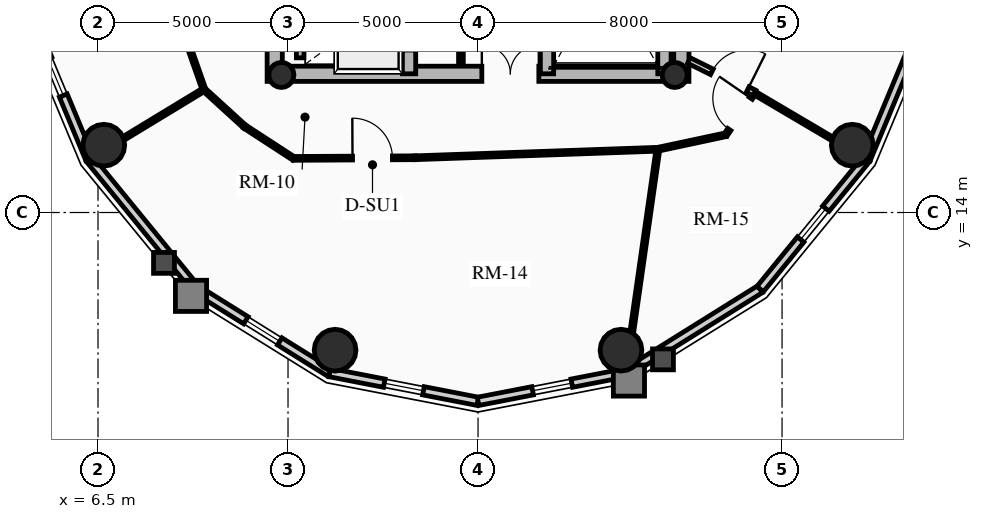
"""IFC4 building model, lengths in metres.
Left out: names, types, materials, properties, quantities, classifications, styles, units other than length and angle.
Written with IfcOpenShell. Run it as: python <this file> out.ifc"""

import sys

from ifc_helpers import new_model, si_unit, direction, frame, frame_2d, origin, origin_2d, place, context, subcontext, project, spatial, rectangle, circle, hollow_circle, extrude, source, transform, mapped, element, fill, save


model = new_model("IFC4")
c1 = context("Model", 3, precision=1e-05, world=origin(), true_north=direction((0.0, 1.0)))
c2 = subcontext(c1, "Body", "Model", "MODEL_VIEW")
j1 = project(units=[si_unit("LENGTHUNIT", "METRE"), si_unit("PLANEANGLEUNIT", "RADIAN")], contexts=[c1])
p1 = place(None, origin())
s1 = spatial("IfcSite", under=j1, at=p1, CompositionType="ELEMENT")
p2 = place(p1, origin())
s2 = spatial("IfcBuilding", under=s1, at=p2, CompositionType="ELEMENT")
p3 = place(p2, frame((0.0, 0.0, 202.48)))
s3 = spatial("IfcBuildingStorey", under=s2, at=p3, CompositionType="ELEMENT", Elevation=202.48)
for number, where, z_axis, x_axis in (
    (1, (11.15, 17.45, 0.0), (0.0, 0.0, 1.0), (0.0, 1.0, 0.0)),
    (2, (21.85, 17.45, 0.0), (0.0, 0.0, 1.0), (0.0, 1.0, 0.0)),
):
    element("IfcWall", number, at=place(p3, frame(where, z_axis=z_axis, x_axis=x_axis)), inside=s3, PredefinedType="SHEAR", context=c2, shape_type="SweptSolid", body=[
        extrude(rectangle(XDim=14.1, YDim=0.4, at=frame_2d((7.05, 0.0))), origin(), (0.0, 0.0, 1.0), 2.91),
    ])
p4 = place(p3, frame((11.15, 17.65, 0.0), z_axis=(0.0, 0.0, 1.0), x_axis=(1.0, 0.0, 0.0)))
e3 = element("IfcWall", 3, at=p4, inside=s3, PredefinedType="SHEAR", context=c2, shape_type="SweptSolid", body=[
    extrude(rectangle(XDim=10.7, YDim=0.4, at=frame_2d((5.35, 0.0))), origin(), (0.0, 0.0, 1.0), 2.91),
])
m1 = source(origin(), c2, "Body", "SweptSolid", [
    extrude(rectangle(XDim=1.5, YDim=2.02, at=frame_2d((0.75, 1.01))), frame((0.0, 0.21, 0.0), z_axis=(0.0, -1.0, 0.0), x_axis=(1.0, 0.0, 0.0)), (0.0, 0.0, 1.0), 0.42),
])
p5 = place(p4, frame((5.45, 0.0, 0.0)))
e4 = element("IfcOpeningElement", 4, at=p5, cuts=e3, PredefinedType="OPENING", context=c2, shape_type="MappedRepresentation", body=[
    mapped(m1, transform((0.0, 0.0, 0.0), x_axis=(1.0, 0.0, 0.0), y_axis=(0.0, 1.0, 0.0), z_axis=(0.0, 0.0, 1.0), scale=1.0)),
])
p6 = place(p3, frame((14.685, 17.65, 0.0), z_axis=(0.0, 0.0, 1.0), x_axis=(0.0, 1.0, 0.0)))
e5 = element("IfcWall", 5, at=p6, inside=s3, PredefinedType="SHEAR", context=c2, shape_type="SweptSolid", body=[
    extrude(rectangle(XDim=13.7, YDim=0.35, at=frame_2d((6.85, 0.0))), origin(), (0.0, 0.0, 1.0), 2.91),
])
m2 = source(origin(), c2, "Body", "SweptSolid", [
    extrude(rectangle(XDim=1.1, YDim=2.015, at=frame_2d((0.55, 1.007))), frame((0.0, 0.185, 0.0), z_axis=(0.0, -1.0, 0.0), x_axis=(1.0, 0.0, 0.0)), (0.0, 0.0, 1.0), 0.37),
])
p7 = place(p6, frame((4.85, 0.0, 0.0)))
e6 = element("IfcOpeningElement", 6, at=p7, cuts=e5, PredefinedType="OPENING", context=c2, shape_type="MappedRepresentation", body=[
    mapped(m2, transform((0.0, 0.0, 0.0), x_axis=(1.0, 0.0, 0.0), y_axis=(0.0, 1.0, 0.0), z_axis=(0.0, 0.0, 1.0), scale=1.0)),
])
p8 = place(p6, frame((0.625, 0.0, 0.0)))
e7 = element("IfcOpeningElement", 7, at=p8, cuts=e5, PredefinedType="OPENING", context=c2, shape_type="MappedRepresentation", body=[
    mapped(m2, transform((0.0, 0.0, 0.0), x_axis=(1.0, 0.0, 0.0), y_axis=(0.0, 1.0, 0.0), z_axis=(0.0, 0.0, 1.0), scale=1.0)),
])
p9 = place(p6, frame((2.625, 0.0, 0.0)))
e8 = element("IfcOpeningElement", 8, at=p9, cuts=e5, PredefinedType="OPENING", context=c2, shape_type="MappedRepresentation", body=[
    mapped(m2, transform((0.0, 0.0, 0.0), x_axis=(1.0, 0.0, 0.0), y_axis=(0.0, 1.0, 0.0), z_axis=(0.0, 0.0, 1.0), scale=1.0)),
])
m3 = source(origin(), c2, "Body", "SweptSolid", [
    extrude(rectangle(XDim=1.15, YDim=2.02, at=frame_2d((0.575, 1.01))), frame((0.0, 0.185, 0.0), z_axis=(0.0, -1.0, 0.0), x_axis=(1.0, 0.0, 0.0)), (0.0, 0.0, 1.0), 0.37),
])
p10 = place(p6, frame((7.27, 0.0, 0.0)))
e9 = element("IfcOpeningElement", 9, at=p10, cuts=e5, PredefinedType="OPENING", context=c2, shape_type="MappedRepresentation", body=[
    mapped(m3, transform((0.0, 0.0, 0.0), x_axis=(1.0, 0.0, 0.0), y_axis=(0.0, 1.0, 0.0), z_axis=(0.0, 0.0, 1.0), scale=1.0)),
])
p11 = place(p3, frame((18.315, 17.65, 0.0), z_axis=(0.0, 0.0, 1.0), x_axis=(0.0, 1.0, 0.0)))
e10 = element("IfcWall", 10, at=p11, inside=s3, PredefinedType="SHEAR", context=c2, shape_type="SweptSolid", body=[
    extrude(rectangle(XDim=9.6, YDim=0.35, at=frame_2d((4.8, 0.0))), origin(), (0.0, 0.0, 1.0), 2.91),
])
p12 = place(p11, frame((5.28, 0.0, 0.0)))
e11 = element("IfcOpeningElement", 11, at=p12, cuts=e10, PredefinedType="OPENING", context=c2, shape_type="MappedRepresentation", body=[
    mapped(m3, transform((0.0, 0.0, 0.0), x_axis=(1.0, 0.0, 0.0), y_axis=(0.0, 1.0, 0.0), z_axis=(0.0, 0.0, 1.0), scale=1.0)),
])
p13 = place(p3, frame((21.405, 17.65, 0.0), z_axis=(0.0, 0.0, 1.0), x_axis=(0.0, 1.0, 0.0)))
e12 = element("IfcWall", 12, at=p13, inside=s3, PredefinedType="SHEAR", context=c2, shape_type="SweptSolid", body=[
    extrude(rectangle(XDim=6.695, YDim=0.35, at=frame_2d((3.348, 0.0))), origin(), (0.0, 0.0, 1.0), 2.91),
])
for number, where, z_axis, x_axis in (
    (13, (11.325, 17.62, 0.0), (0.0, 0.0, 1.0), (1.0, 0.0, 0.0)),
    (14, (21.675, 17.62, 0.0), (0.0, 0.0, 1.0), (1.0, 0.0, 0.0)),
):
    element("IfcColumn", number, at=place(p3, frame(where, z_axis=z_axis, x_axis=x_axis)), inside=s3, PredefinedType="COLUMN", context=c2, shape_type="SweptSolid", body=[
        extrude(hollow_circle(Radius=0.33, WallThickness=0.025, at=origin_2d()), origin(), (0.0, 0.0, 1.0), 2.91),
    ])
for number, where, z_axis, x_axis in (
    (15, (6.653, 15.771, 0.0), (0.0, 0.0, 1.0), (1.0, 0.0, 0.0)),
    (16, (12.739, 10.377, 0.0), (0.0, 0.0, 1.0), (1.0, 0.0, 0.0)),
    (17, (20.261, 10.377, 0.0), (0.0, 0.0, 1.0), (1.0, 0.0, 0.0)),
    (18, (26.347, 15.771, 0.0), (0.0, 0.0, 1.0), (1.0, 0.0, 0.0)),
):
    element("IfcColumn", number, at=place(p3, frame(where, z_axis=z_axis, x_axis=x_axis)), inside=s3, PredefinedType="USERDEFINED", context=c2, shape_type="SweptSolid", body=[
        extrude(circle(Radius=0.55, at=origin_2d()), origin(), (0.0, 0.0, 1.0), 2.91),
    ])
p14 = place(p3, frame((6.282, 15.407, 0.0), z_axis=(0.0, 0.0, 1.0), x_axis=(-0.384036305194, 0.923317993052, 0.0)))
e19 = element("IfcWall", 19, at=p14, inside=s3, PredefinedType="SOLIDWALL", context=c2, shape_type="SweptSolid", body=[
    extrude(rectangle(XDim=4.671, YDim=0.22, at=frame_2d((2.335, 0.0))), origin(), (0.0, 0.0, 1.0), 2.322),
])
m4 = source(origin(), c2, "Body", "SweptSolid", [
    extrude(rectangle(XDim=1.05, YDim=1.3, at=frame_2d((0.525, 0.65))), frame((0.0, 0.12, 0.0), z_axis=(0.0, -1.0, 0.0), x_axis=(1.0, 0.0, 0.0)), (0.0, 0.0, 1.0), 0.24),
])
p15 = place(p14, frame((1.81, 0.0, 0.65)))
e20 = element("IfcOpeningElement", 20, at=p15, cuts=e19, PredefinedType="OPENING", context=c2, shape_type="MappedRepresentation", body=[
    mapped(m4, transform((0.0, 0.0, 0.0), x_axis=(1.0, 0.0, 0.0), y_axis=(0.0, 1.0, 0.0), z_axis=(0.0, 0.0, 1.0), scale=1.0)),
])
p16 = place(p3, frame((9.076, 11.985, 0.0), z_axis=(0.0, 0.0, 1.0), x_axis=(-0.632467166636, 0.774587169483, 0.0)))
e21 = element("IfcWall", 21, at=p16, inside=s3, PredefinedType="SOLIDWALL", context=c2, shape_type="SweptSolid", body=[
    extrude(rectangle(XDim=4.418, YDim=0.22, at=frame_2d((2.209, 0.0))), origin(), (0.0, 0.0, 1.0), 2.322),
])
p17 = place(p3, frame((12.597, 9.787, 0.0), z_axis=(0.0, 0.0, 1.0), x_axis=(-0.848318713376, 0.529485939886, 0.0)))
e22 = element("IfcWall", 22, at=p17, inside=s3, PredefinedType="SOLIDWALL", context=c2, shape_type="SweptSolid", body=[
    extrude(rectangle(XDim=4.15, YDim=0.22, at=frame_2d((2.075, 0.0))), origin(), (0.0, 0.0, 1.0), 2.322),
])
p18 = place(p17, frame((1.55, 0.0, 0.65)))
e23 = element("IfcOpeningElement", 23, at=p18, cuts=e22, PredefinedType="OPENING", context=c2, shape_type="MappedRepresentation", body=[
    mapped(m4, transform((0.0, 0.0, 0.0), x_axis=(1.0, 0.0, 0.0), y_axis=(0.0, 1.0, 0.0), z_axis=(0.0, 0.0, 1.0), scale=1.0)),
])
p19 = place(p3, frame((16.5, 9.03, 0.0), z_axis=(0.0, 0.0, 1.0), x_axis=(-0.981700307484, 0.190432419211, 0.0)))
e24 = element("IfcWall", 24, at=p19, inside=s3, PredefinedType="SOLIDWALL", context=c2, shape_type="SweptSolid", body=[
    extrude(rectangle(XDim=3.976, YDim=0.22, at=frame_2d((1.988, 0.0))), origin(), (0.0, 0.0, 1.0), 2.322),
])
p20 = place(p19, frame((1.463, 0.0, 0.65)))
e25 = element("IfcOpeningElement", 25, at=p20, cuts=e24, PredefinedType="OPENING", context=c2, shape_type="MappedRepresentation", body=[
    mapped(m4, transform((0.0, 0.0, 0.0), x_axis=(1.0, 0.0, 0.0), y_axis=(0.0, 1.0, 0.0), z_axis=(0.0, 0.0, 1.0), scale=1.0)),
])
p21 = place(p3, frame((20.403, 9.787, 0.0), z_axis=(0.0, 0.0, 1.0), x_axis=(-0.981700307484, -0.190432419211, 0.0)))
e26 = element("IfcWall", 26, at=p21, inside=s3, PredefinedType="SOLIDWALL", context=c2, shape_type="SweptSolid", body=[
    extrude(rectangle(XDim=3.976, YDim=0.22, at=frame_2d((1.988, 0.0))), origin(), (0.0, 0.0, 1.0), 2.322),
])
p22 = place(p21, frame((1.463, 0.0, 0.65)))
e27 = element("IfcOpeningElement", 27, at=p22, cuts=e26, PredefinedType="OPENING", context=c2, shape_type="MappedRepresentation", body=[
    mapped(m4, transform((0.0, 0.0, 0.0), x_axis=(1.0, 0.0, 0.0), y_axis=(0.0, 1.0, 0.0), z_axis=(0.0, 0.0, 1.0), scale=1.0)),
])
p23 = place(p3, frame((23.924, 11.985, 0.0), z_axis=(0.0, 0.0, 1.0), x_axis=(-0.848318713376, -0.529485939886, 0.0)))
e28 = element("IfcWall", 28, at=p23, inside=s3, PredefinedType="SOLIDWALL", context=c2, shape_type="SweptSolid", body=[
    extrude(rectangle(XDim=4.15, YDim=0.22, at=frame_2d((2.075, 0.0))), origin(), (0.0, 0.0, 1.0), 2.322),
])
p24 = place(p3, frame((26.718, 15.407, 0.0), z_axis=(0.0, 0.0, 1.0), x_axis=(-0.632467166636, -0.774587169483, 0.0)))
e29 = element("IfcWall", 29, at=p24, inside=s3, PredefinedType="SOLIDWALL", context=c2, shape_type="SweptSolid", body=[
    extrude(rectangle(XDim=4.418, YDim=0.22, at=frame_2d((2.209, 0.0))), origin(), (0.0, 0.0, 1.0), 2.322),
])
p25 = place(p24, frame((1.684, 0.0, 0.65)))
e30 = element("IfcOpeningElement", 30, at=p25, cuts=e29, PredefinedType="OPENING", context=c2, shape_type="MappedRepresentation", body=[
    mapped(m4, transform((0.0, 0.0, 0.0), x_axis=(1.0, 0.0, 0.0), y_axis=(0.0, 1.0, 0.0), z_axis=(0.0, 0.0, 1.0), scale=1.0)),
])
p26 = place(p3, frame((28.512, 19.719, 0.0), z_axis=(0.0, 0.0, 1.0), x_axis=(-0.384036305194, -0.923317993052, 0.0)))
e31 = element("IfcWall", 31, at=p26, inside=s3, PredefinedType="SOLIDWALL", context=c2, shape_type="SweptSolid", body=[
    extrude(rectangle(XDim=4.671, YDim=0.22, at=frame_2d((2.335, 0.0))), origin(), (0.0, 0.0, 1.0), 2.322),
])
p27 = place(p3, frame((11.82, 18.07, 0.0), z_axis=(0.0, 0.0, 1.0), x_axis=(0.0, 1.0, 0.0)))
e32 = element("IfcWall", 32, at=p27, inside=s3, PredefinedType="SHEAR", context=c2, shape_type="SweptSolid", body=[
    extrude(rectangle(XDim=1.635, YDim=0.2, at=frame_2d((0.817, 0.0))), origin(), (0.0, 0.0, 1.0), 2.91),
])
p28 = place(p3, frame((16.05, 17.92, 0.0), z_axis=(0.0, 0.0, 1.0), x_axis=(0.0, 1.0, 0.0)))
e33 = element("IfcWall", 33, at=p28, inside=s3, PredefinedType="PARTITIONING", context=c2, shape_type="SweptSolid", body=[
    extrude(rectangle(XDim=3.08, YDim=0.125, at=frame_2d((1.54, 0.0))), origin(), (0.0, 0.0, 1.0), 2.685),
])
m5 = source(origin(), c2, "Body", "SweptSolid", [
    extrude(rectangle(XDim=0.9, YDim=2.005, at=frame_2d((0.45, 1.002))), frame((0.0, 0.073, 0.0), z_axis=(0.0, -1.0, 0.0), x_axis=(1.0, 0.0, 0.0)), (0.0, 0.0, 1.0), 0.145),
])
p29 = place(p28, frame((1.05, 0.0, 0.0)))
e34 = element("IfcOpeningElement", 34, at=p29, cuts=e33, PredefinedType="OPENING", context=c2, shape_type="MappedRepresentation", body=[
    mapped(m5, transform((0.0, 0.0, 0.0), x_axis=(1.0, 0.0, 0.0), y_axis=(0.0, 1.0, 0.0), z_axis=(0.0, 0.0, 1.0), scale=1.0)),
])
p30 = place(p3, frame((8.832, 18.534, 0.0), z_axis=(0.0, 0.0, 1.0), x_axis=(0.332031819657, -0.943268186008, 0.0)))
e35 = element("IfcWall", 35, at=p30, inside=s3, PredefinedType="MOVABLE", context=c2, shape_type="SweptSolid", body=[
    extrude(rectangle(XDim=1.377, YDim=0.1, at=frame_2d((0.688, 0.0))), origin(), (0.0, 0.0, 1.0), 2.255),
])
p31 = place(p3, frame((9.289, 17.235, 0.0), z_axis=(0.0, 0.0, 1.0), x_axis=(0.739015164946, -0.673688790155, 0.0)))
e36 = element("IfcWall", 36, at=p31, inside=s3, PredefinedType="MOVABLE", context=c2, shape_type="SweptSolid", body=[
    extrude(rectangle(XDim=1.446, YDim=0.1, at=frame_2d((0.723, 0.0))), origin(), (0.0, 0.0, 1.0), 2.322),
])
p32 = place(p3, frame((10.358, 16.26, 0.0), z_axis=(0.0, 0.0, 1.0), x_axis=(0.838265397059, -0.545262435983, 0.0)))
e37 = element("IfcWall", 37, at=p32, inside=s3, PredefinedType="MOVABLE", context=c2, shape_type="SweptSolid", body=[
    extrude(rectangle(XDim=1.534, YDim=0.1, at=frame_2d((0.767, 0.0))), origin(), (0.0, 0.0, 1.0), 2.255),
])
p33 = place(p3, frame((11.644, 15.424, 0.0), z_axis=(0.0, 0.0, 1.0), x_axis=(0.999986552511, 0.005186019339, 0.0)))
e38 = element("IfcWall", 38, at=p33, inside=s3, PredefinedType="MOVABLE", context=c2, shape_type="SweptSolid", body=[
    extrude(rectangle(XDim=3.201, YDim=0.1, at=frame_2d((1.601, 0.0))), origin(), (0.0, 0.0, 1.0), 2.322),
])
m6 = source(origin(), c2, "Body", "SweptSolid", [
    extrude(rectangle(XDim=1.05, YDim=2.015, at=frame_2d((0.525, 1.007))), frame((0.0, 0.06, 0.0), z_axis=(0.0, -1.0, 0.0), x_axis=(1.0, 0.0, 0.0)), (0.0, 0.0, 1.0), 0.12),
])
p34 = place(p33, frame((1.553, 0.0, 0.0)))
e39 = element("IfcOpeningElement", 39, at=p34, cuts=e38, PredefinedType="OPENING", context=c2, shape_type="MappedRepresentation", body=[
    mapped(m6, transform((0.0, 0.0, 0.0), x_axis=(1.0, 0.0, 0.0), y_axis=(0.0, 1.0, 0.0), z_axis=(0.0, 0.0, 1.0), scale=1.0)),
])
p35 = place(p3, frame((14.845, 15.441, 0.0), z_axis=(0.0, 0.0, 1.0), x_axis=(0.99938794868, 0.034981824334, 0.0)))
e40 = element("IfcWall", 40, at=p35, inside=s3, PredefinedType="MOVABLE", context=c2, shape_type="SweptSolid", body=[
    extrude(rectangle(XDim=6.393, YDim=0.1, at=frame_2d((3.196, 0.0))), origin(), (0.0, 0.0, 1.0), 2.255),
])
p36 = place(p3, frame((21.234, 15.664, 0.0), z_axis=(0.0, 0.0, 1.0), x_axis=(0.977931581182, 0.208925399431, 0.0)))
e41 = element("IfcWall", 41, at=p36, inside=s3, PredefinedType="MOVABLE", context=c2, shape_type="SweptSolid", body=[
    extrude(rectangle(XDim=1.823, YDim=0.1, at=frame_2d((0.912, 0.0))), origin(), (0.0, 0.0, 1.0), 2.255),
])
p37 = place(p3, frame((23.017, 16.045, 0.0), z_axis=(0.0, 0.0, 1.0), x_axis=(0.566660656138, 0.823951273308, 0.0)))
e42 = element("IfcWall", 42, at=p37, inside=s3, PredefinedType="MOVABLE", context=c2, shape_type="SweptSolid", body=[
    extrude(rectangle(XDim=1.336, YDim=0.1, at=frame_2d((0.668, 0.0))), origin(), (0.0, 0.0, 1.0), 2.322),
])
m7 = source(origin(), c2, "Body", "SweptSolid", [
    extrude(rectangle(XDim=1.0, YDim=2.015, at=frame_2d((0.5, 1.007))), frame((0.0, 0.06, 0.0), z_axis=(0.0, -1.0, 0.0), x_axis=(1.0, 0.0, 0.0)), (0.0, 0.0, 1.0), 0.12),
])
p38 = place(p37, frame((0.168, 0.0, 0.0)))
e43 = element("IfcOpeningElement", 43, at=p38, cuts=e42, PredefinedType="OPENING", context=c2, shape_type="MappedRepresentation", body=[
    mapped(m7, transform((0.0, 0.0, 0.0), x_axis=(1.0, 0.0, 0.0), y_axis=(0.0, 1.0, 0.0), z_axis=(0.0, 0.0, 1.0), scale=1.0)),
])
p39 = place(p3, frame((9.289, 17.235, 0.0), z_axis=(0.0, 0.0, 1.0), x_axis=(-0.854741081983, -0.519054604806, 0.0)))
e44 = element("IfcWall", 44, at=p39, inside=s3, PredefinedType="MOVABLE", context=c2, shape_type="SweptSolid", body=[
    extrude(rectangle(XDim=3.499, YDim=0.1, at=frame_2d((1.75, 0.0))), origin(), (0.0, 0.0, 1.0), 2.322),
])
p40 = place(p3, frame((21.234, 15.664, 0.0), z_axis=(0.0, 0.0, 1.0), x_axis=(-0.141467563045, -0.989942891588, 0.0)))
e45 = element("IfcWall", 45, at=p40, inside=s3, PredefinedType="MOVABLE", context=c2, shape_type="SweptSolid", body=[
    extrude(rectangle(XDim=5.918, YDim=0.1, at=frame_2d((2.959, 0.0))), origin(), (0.0, 0.0, 1.0), 2.322),
])
p41 = place(p3, frame((23.774, 17.146, 0.0), z_axis=(0.0, 0.0, 1.0), x_axis=(0.861296601099, -0.508102514198, 0.0)))
e46 = element("IfcWall", 46, at=p41, inside=s3, PredefinedType="MOVABLE", context=c2, shape_type="SweptSolid", body=[
    extrude(rectangle(XDim=3.399, YDim=0.1, at=frame_2d((1.7, 0.0))), origin(), (0.0, 0.0, 1.0), 2.322),
])
p42 = place(p3, frame((22.05, 18.0, 0.0), z_axis=(0.0, 0.0, 1.0), x_axis=(0.896045848613, -0.443961526692, 0.0)))
e47 = element("IfcWall", 47, at=p42, inside=s3, PredefinedType="PARTITIONING", context=c2, shape_type="SweptSolid", body=[
    extrude(rectangle(XDim=1.924, YDim=0.16, at=frame_2d((0.962, 0.0))), origin(), (0.0, 0.0, 1.0), 2.255),
])
m8 = source(origin(), c2, "Body", "SweptSolid", [
    extrude(rectangle(XDim=1.05, YDim=2.015, at=frame_2d((0.525, 1.007))), frame((0.0, 0.09, 0.0), z_axis=(0.0, -1.0, 0.0), x_axis=(1.0, 0.0, 0.0)), (0.0, 0.0, 1.0), 0.18),
])
p43 = place(p42, frame((0.674, 0.0, 0.0)))
e48 = element("IfcOpeningElement", 48, at=p43, cuts=e47, PredefinedType="OPENING", context=c2, shape_type="MappedRepresentation", body=[
    mapped(m8, transform((0.0, 0.0, 0.0), x_axis=(1.0, 0.0, 0.0), y_axis=(0.0, 1.0, 0.0), z_axis=(0.0, 0.0, 1.0), scale=1.0)),
])
m9 = source(origin(), c2, "Body", "SweptSolid", [
    extrude(rectangle(XDim=1.05, YDim=1.3, at=frame_2d((0.525, 0.65))), frame((0.0, 0.03, 0.0), z_axis=(0.0, -1.0, 0.0), x_axis=(1.0, 0.0, 0.0)), (0.0, 0.0, 1.0), 0.06),
])
p44 = place(p15, origin())
e49 = element("IfcWindow", 49, at=p44, inside=s3, PartitioningType="SINGLE_PANEL", PredefinedType="WINDOW", context=c2, shape_type="MappedRepresentation", body=[
    mapped(m9, transform((0.0, 0.0, 0.0), x_axis=(1.0, 0.0, 0.0), y_axis=(0.0, 1.0, 0.0), z_axis=(0.0, 0.0, 1.0), scale=1.0)),
])
fill(e20, e49)
p45 = place(p18, origin())
e50 = element("IfcWindow", 50, at=p45, inside=s3, PartitioningType="SINGLE_PANEL", PredefinedType="WINDOW", context=c2, shape_type="MappedRepresentation", body=[
    mapped(m9, transform((0.0, 0.0, 0.0), x_axis=(1.0, 0.0, 0.0), y_axis=(0.0, 1.0, 0.0), z_axis=(0.0, 0.0, 1.0), scale=1.0)),
])
fill(e23, e50)
p46 = place(p20, origin())
e51 = element("IfcWindow", 51, at=p46, inside=s3, PartitioningType="SINGLE_PANEL", PredefinedType="WINDOW", context=c2, shape_type="MappedRepresentation", body=[
    mapped(m9, transform((0.0, 0.0, 0.0), x_axis=(1.0, 0.0, 0.0), y_axis=(0.0, 1.0, 0.0), z_axis=(0.0, 0.0, 1.0), scale=1.0)),
])
fill(e25, e51)
p47 = place(p22, origin())
e52 = element("IfcWindow", 52, at=p47, inside=s3, PartitioningType="SINGLE_PANEL", PredefinedType="WINDOW", context=c2, shape_type="MappedRepresentation", body=[
    mapped(m9, transform((0.0, 0.0, 0.0), x_axis=(1.0, 0.0, 0.0), y_axis=(0.0, 1.0, 0.0), z_axis=(0.0, 0.0, 1.0), scale=1.0)),
])
fill(e27, e52)
p48 = place(p25, origin())
e53 = element("IfcWindow", 53, at=p48, inside=s3, PartitioningType="SINGLE_PANEL", PredefinedType="WINDOW", context=c2, shape_type="MappedRepresentation", body=[
    mapped(m9, transform((0.0, 0.0, 0.0), x_axis=(1.0, 0.0, 0.0), y_axis=(0.0, 1.0, 0.0), z_axis=(0.0, 0.0, 1.0), scale=1.0)),
])
fill(e30, e53)
m10 = source(origin(), c2, "Body", "SweptSolid", [
    extrude(rectangle(XDim=1.5, YDim=2.02, at=frame_2d((0.75, 1.01))), frame((0.0, 0.025, 0.0), z_axis=(0.0, -1.0, 0.0), x_axis=(1.0, 0.0, 0.0)), (0.0, 0.0, 1.0), 0.05),
])
p49 = place(p5, origin())
e54 = element("IfcDoor", 54, at=p49, inside=s3, OperationType="DOUBLE_DOOR_SINGLE_SWING", PredefinedType="DOOR", context=c2, shape_type="MappedRepresentation", body=[
    mapped(m10, transform((0.0, 0.0, 0.0), x_axis=(1.0, 0.0, 0.0), y_axis=(0.0, 1.0, 0.0), z_axis=(0.0, 0.0, 1.0), scale=1.0)),
])
fill(e4, e54)
m11 = source(origin(), c2, "Body", "SweptSolid", [
    extrude(rectangle(XDim=1.05, YDim=2.015, at=frame_2d((0.525, 1.007))), frame((0.0, 0.025, 0.0), z_axis=(0.0, -1.0, 0.0), x_axis=(1.0, 0.0, 0.0)), (0.0, 0.0, 1.0), 0.05),
])
p50 = place(p43, origin())
e55 = element("IfcDoor", 55, at=p50, inside=s3, OperationType="SINGLE_SWING_RIGHT", PredefinedType="DOOR", context=c2, shape_type="MappedRepresentation", body=[
    mapped(m11, transform((0.0, 0.0, 0.0), x_axis=(1.0, 0.0, 0.0), y_axis=(0.0, 1.0, 0.0), z_axis=(0.0, 0.0, 1.0), scale=1.0)),
])
fill(e48, e55)
p51 = place(p34, origin())
e56 = element("IfcDoor", 56, at=p51, inside=s3, OperationType="SINGLE_SWING_LEFT", PredefinedType="DOOR", context=c2, shape_type="MappedRepresentation", body=[
    mapped(m11, transform((0.0, 0.0, 0.0), x_axis=(1.0, 0.0, 0.0), y_axis=(0.0, 1.0, 0.0), z_axis=(0.0, 0.0, 1.0), scale=1.0)),
])
fill(e39, e56)
m12 = source(origin(), c2, "Body", "SweptSolid", [
    extrude(rectangle(XDim=1.0, YDim=2.015, at=frame_2d((0.5, 1.007))), frame((0.0, 0.025, 0.0), z_axis=(0.0, -1.0, 0.0), x_axis=(1.0, 0.0, 0.0)), (0.0, 0.0, 1.0), 0.05),
])
p52 = place(p38, origin())
e57 = element("IfcDoor", 57, at=p52, inside=s3, OperationType="SINGLE_SWING_RIGHT", PredefinedType="DOOR", context=c2, shape_type="MappedRepresentation", body=[
    mapped(m12, transform((0.0, 0.0, 0.0), x_axis=(1.0, 0.0, 0.0), y_axis=(0.0, 1.0, 0.0), z_axis=(0.0, 0.0, 1.0), scale=1.0)),
])
fill(e43, e57)
save(model, sys.argv[1])
